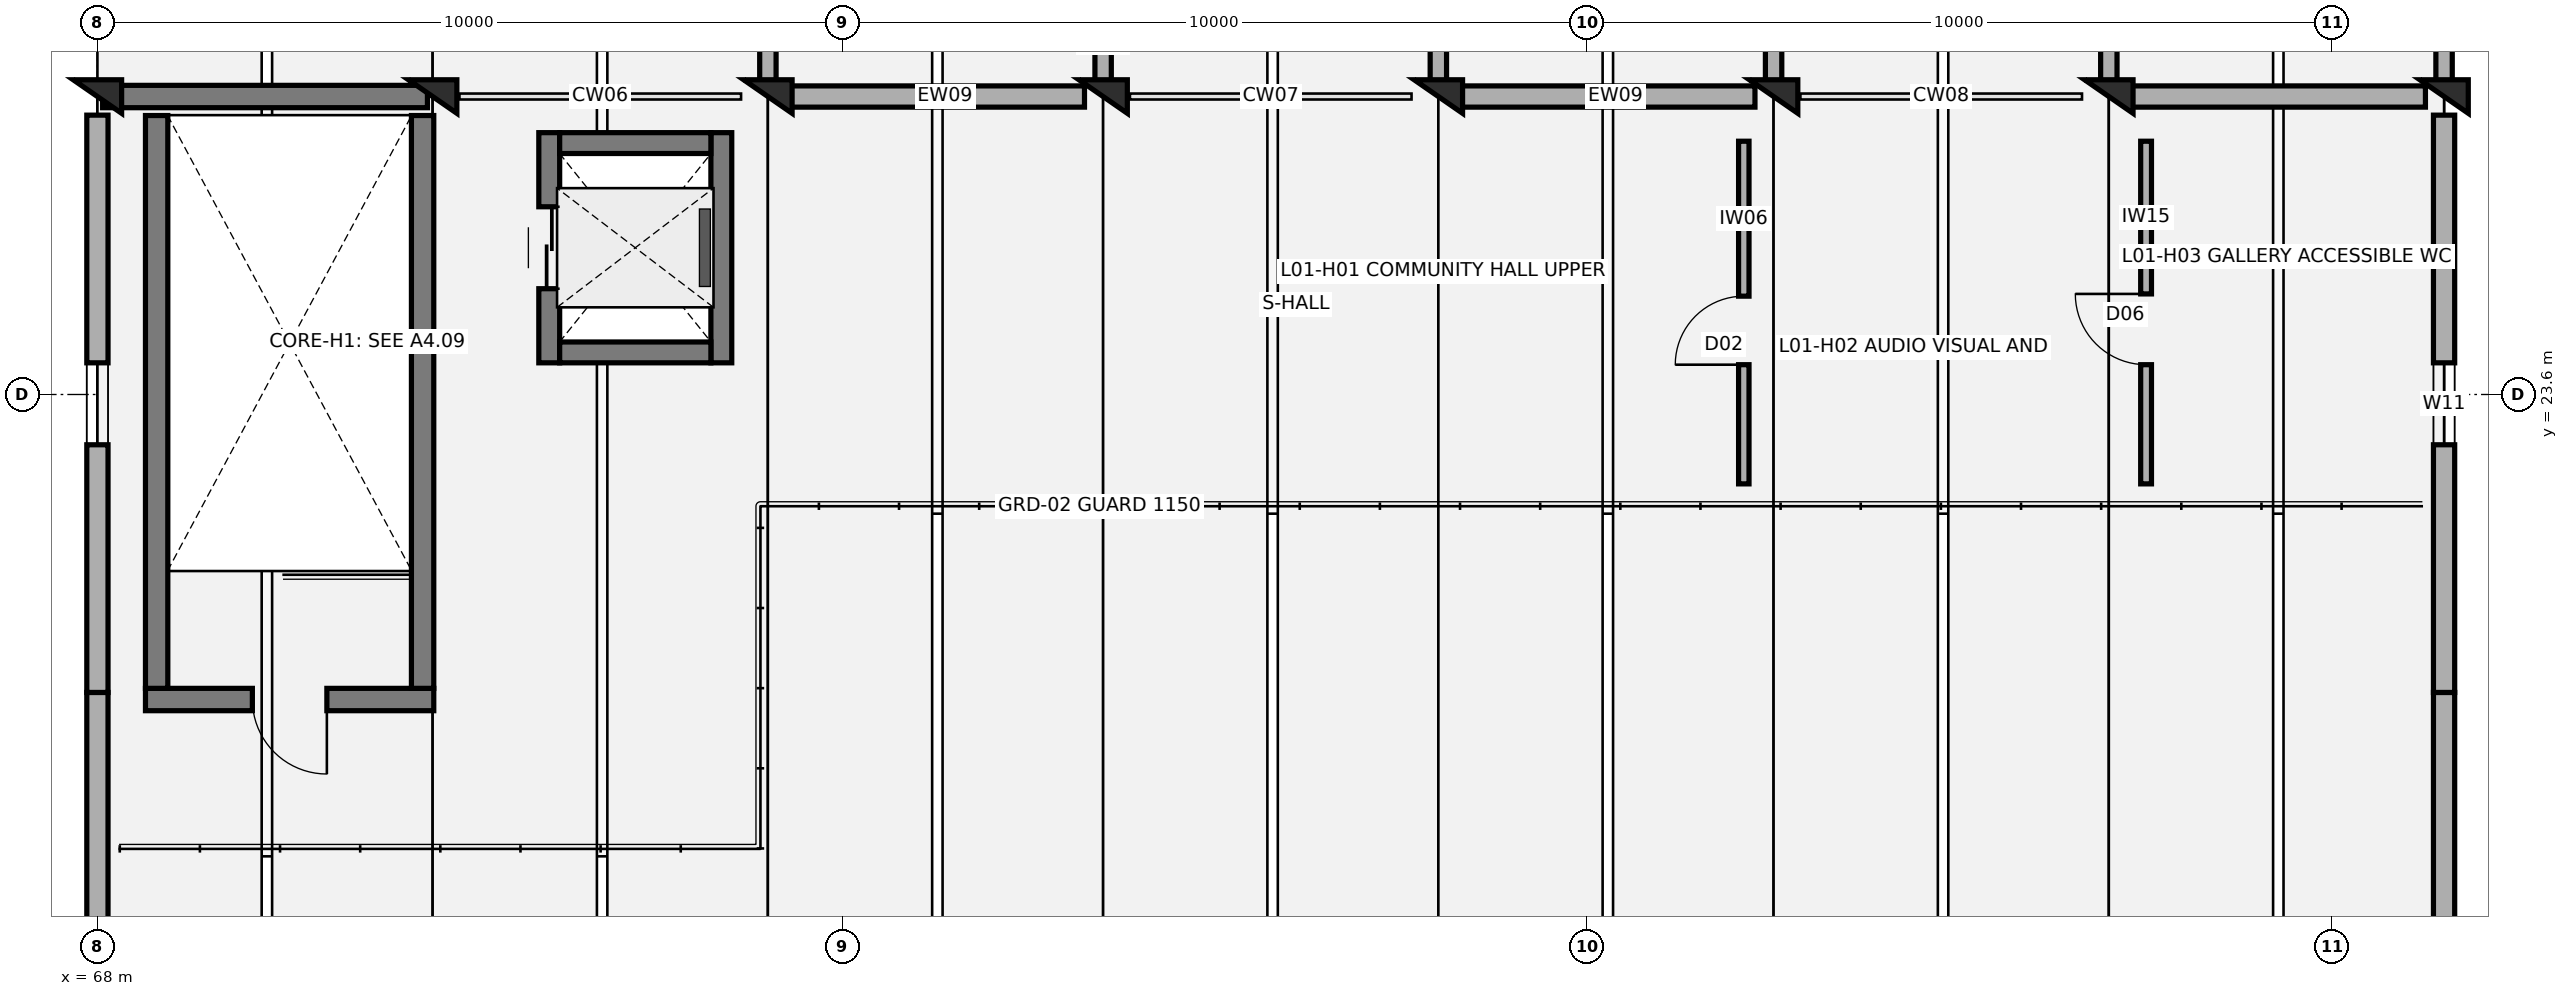
"""IFC4 building model, lengths in metres.
Left out: names, types, materials, properties, quantities, classifications, styles, units other than length and angle.
Written with IfcOpenShell. Run it as: python <this file> out.ifc"""

import sys

from ifc_helpers import new_model, si_unit, direction, frame, frame_2d, origin, origin_2d, place, context, subcontext, project, spatial, rectangle, extrude, element, fill, save


model = new_model("IFC4")
c1 = context("Model", 3, precision=1e-05, world=origin(), true_north=direction((0.0, 1.0)))
c2 = subcontext(c1, "Body", "Model", "MODEL_VIEW")
j1 = project(units=[si_unit("LENGTHUNIT", "METRE"), si_unit("PLANEANGLEUNIT", "RADIAN")], contexts=[c1])
p1 = place(None, origin())
s1 = spatial("IfcSite", under=j1, at=p1, CompositionType="ELEMENT")
p2 = place(p1, origin())
s2 = spatial("IfcBuilding", under=s1, at=p2, CompositionType="ELEMENT")
p3 = place(p2, frame((0.0, 0.0, 4.5)))
s3 = spatial("IfcBuildingStorey", under=s2, at=p3, CompositionType="ELEMENT", Elevation=4.5)
for number, where, z_axis, x_axis in (
    (1, (68.0, 27.6, 0.0), (0.0, 0.0, 1.0), (0.0, 1.0, 0.0)),
    (2, (72.5, 27.6, 0.0), (0.0, 0.0, 1.0), (0.0, 1.0, 0.0)),
    (3, (77.0, 27.6, 0.0), (0.0, 0.0, 1.0), (0.0, 1.0, 0.0)),
    (4, (81.5, 27.6, 0.0), (0.0, 0.0, 1.0), (0.0, 1.0, 0.0)),
    (5, (86.0, 27.6, 0.0), (0.0, 0.0, 1.0), (0.0, 1.0, 0.0)),
    (6, (90.5, 27.6, 0.0), (0.0, 0.0, 1.0), (0.0, 1.0, 0.0)),
    (7, (95.0, 27.6, 0.0), (0.0, 0.0, 1.0), (0.0, 1.0, 0.0)),
    (8, (99.5, 27.6, 0.0), (0.0, 0.0, 1.0), (0.0, 1.0, 0.0)),
):
    element("IfcColumn", number, at=place(p3, frame(where, z_axis=z_axis, x_axis=x_axis)), inside=s3, PredefinedType="COLUMN", context=c2, shape_type="SweptSolid", body=[
        extrude(rectangle(XDim=0.45, YDim=0.65, at=origin_2d()), origin(), (0.0, 0.0, 1.0), 3.7),
    ])
for number, where, z_axis, x_axis in (
    (9, (77.25, 27.6, 0.0), (0.0, 0.0, 1.0), (1.0, 0.0, 0.0)),
    (10, (86.25, 27.6, 0.0), (0.0, 0.0, 1.0), (1.0, 0.0, 0.0)),
    (11, (95.25, 27.6, 0.0), (0.0, 0.0, 1.0), (1.0, 0.0, 0.0)),
):
    element("IfcWall", number, at=place(p3, frame(where, z_axis=z_axis, x_axis=x_axis)), inside=s3, PredefinedType="SOLIDWALL", context=c2, shape_type="SweptSolid", body=[
        extrude(rectangle(XDim=4.0, YDim=0.285, at=frame_2d((2.0, 0.0))), origin(), (0.0, 0.0, 1.0), 2.25),
    ])
p4 = place(p3, frame((68.0, 11.6, 0.0), z_axis=(0.0, 0.0, 1.0), x_axis=(0.0, 1.0, 0.0)))
e12 = element("IfcWall", 12, at=p4, inside=s3, PredefinedType="SOLIDWALL", context=c2, shape_type="SweptSolid", body=[
    extrude(rectangle(XDim=8.0, YDim=0.285, at=frame_2d((4.0, 0.0))), origin(), (0.0, 0.0, 1.0), 2.25),
])
p5 = place(p4, frame((3.45, 0.0, 0.45)))
e13 = element("IfcOpeningElement", 13, at=p5, cuts=e12, PredefinedType="OPENING", context=c2, shape_type="SweptSolid", body=[
    extrude(rectangle(XDim=1.1, YDim=1.2, at=frame_2d((0.55, 0.6))), frame((0.0, 0.152, 0.0), z_axis=(0.0, -1.0, 0.0), x_axis=(1.0, 0.0, 0.0)), (0.0, 0.0, 1.0), 0.305),
])
p6 = place(p3, frame((68.0, 19.6, 0.0), z_axis=(0.0, 0.0, 1.0), x_axis=(0.0, 1.0, 0.0)))
e14 = element("IfcWall", 14, at=p6, inside=s3, PredefinedType="SOLIDWALL", context=c2, shape_type="SweptSolid", body=[
    extrude(rectangle(XDim=7.75, YDim=0.285, at=frame_2d((3.875, 0.0))), origin(), (0.0, 0.0, 1.0), 2.25),
])
p7 = place(p6, frame((3.325, 0.0, 0.45)))
e15 = element("IfcOpeningElement", 15, at=p7, cuts=e14, PredefinedType="OPENING", context=c2, shape_type="SweptSolid", body=[
    extrude(rectangle(XDim=1.1, YDim=1.2, at=frame_2d((0.55, 0.6))), frame((0.0, 0.152, 0.0), z_axis=(0.0, -1.0, 0.0), x_axis=(1.0, 0.0, 0.0)), (0.0, 0.0, 1.0), 0.305),
])
p8 = place(p3, frame((99.5, 11.6, 0.0), z_axis=(0.0, 0.0, 1.0), x_axis=(0.0, 1.0, 0.0)))
e16 = element("IfcWall", 16, at=p8, inside=s3, PredefinedType="SOLIDWALL", context=c2, shape_type="SweptSolid", body=[
    extrude(rectangle(XDim=8.0, YDim=0.285, at=frame_2d((4.0, 0.0))), origin(), (0.0, 0.0, 1.0), 2.25),
])
p9 = place(p8, frame((3.45, 0.0, 0.45)))
e17 = element("IfcOpeningElement", 17, at=p9, cuts=e16, PredefinedType="OPENING", context=c2, shape_type="SweptSolid", body=[
    extrude(rectangle(XDim=1.1, YDim=1.2, at=frame_2d((0.55, 0.6))), frame((0.0, 0.152, 0.0), z_axis=(0.0, -1.0, 0.0), x_axis=(1.0, 0.0, 0.0)), (0.0, 0.0, 1.0), 0.305),
])
p10 = place(p3, frame((99.5, 19.6, 0.0), z_axis=(0.0, 0.0, 1.0), x_axis=(0.0, 1.0, 0.0)))
e18 = element("IfcWall", 18, at=p10, inside=s3, PredefinedType="SOLIDWALL", context=c2, shape_type="SweptSolid", body=[
    extrude(rectangle(XDim=7.75, YDim=0.285, at=frame_2d((3.875, 0.0))), origin(), (0.0, 0.0, 1.0), 2.25),
])
p11 = place(p10, frame((3.325, 0.0, 0.45)))
e19 = element("IfcOpeningElement", 19, at=p11, cuts=e18, PredefinedType="OPENING", context=c2, shape_type="SweptSolid", body=[
    extrude(rectangle(XDim=1.1, YDim=1.2, at=frame_2d((0.55, 0.6))), frame((0.0, 0.152, 0.0), z_axis=(0.0, -1.0, 0.0), x_axis=(1.0, 0.0, 0.0)), (0.0, 0.0, 1.0), 0.305),
])
for number, where, z_axis, x_axis in (
    (20, (77.0, 27.78, 0.0), (0.0, 0.0, 1.0), (0.0, 1.0, 0.0)),
    (21, (81.5, 27.78, 0.0), (0.0, 0.0, 1.0), (0.0, 1.0, 0.0)),
    (22, (86.0, 27.78, 0.0), (0.0, 0.0, 1.0), (0.0, 1.0, 0.0)),
    (23, (90.5, 27.78, 0.0), (0.0, 0.0, 1.0), (0.0, 1.0, 0.0)),
    (24, (95.0, 27.78, 0.0), (0.0, 0.0, 1.0), (0.0, 1.0, 0.0)),
    (25, (99.5, 27.78, 0.0), (0.0, 0.0, 1.0), (0.0, 1.0, 0.0)),
):
    element("IfcWall", number, at=place(p3, frame(where, z_axis=z_axis, x_axis=x_axis)), inside=s3, PredefinedType="PARAPET", context=c2, shape_type="SweptSolid", body=[
        extrude(rectangle(XDim=0.87, YDim=0.22, at=frame_2d((0.435, 0.0))), origin(), (0.0, 0.0, 1.0), 3.1),
    ])
p12 = place(p3, frame((72.515, 19.505, 0.0), z_axis=(0.0, 0.0, 1.0), x_axis=(-1.0, 0.0, 0.0)))
e26 = element("IfcWall", 26, at=p12, inside=s3, PredefinedType="SHEAR", context=c2, shape_type="SweptSolid", body=[
    extrude(rectangle(XDim=3.87, YDim=0.3, at=frame_2d((1.935, 0.0))), origin(), (0.0, 0.0, 1.0), 3.6),
])
p13 = place(p12, frame((1.435, 0.0, 0.0)))
e27 = element("IfcOpeningElement", 27, at=p13, cuts=e26, PredefinedType="OPENING", context=c2, shape_type="SweptSolid", body=[
    extrude(rectangle(XDim=1.0, YDim=2.15, at=frame_2d((0.5, 1.075))), frame((0.0, 0.16, 0.0), z_axis=(0.0, -1.0, 0.0), x_axis=(1.0, 0.0, 0.0)), (0.0, 0.0, 1.0), 0.32),
])
p14 = place(p3, frame((72.43, 27.6, 0.0), z_axis=(0.0, 0.0, 1.0), x_axis=(-1.0, 0.0, 0.0)))
e28 = element("IfcWall", 28, at=p14, inside=s3, PredefinedType="SHEAR", context=c2, shape_type="SweptSolid", body=[
    extrude(rectangle(XDim=4.36, YDim=0.3, at=frame_2d((2.18, 0.0))), origin(), (0.0, 0.0, 1.0), 3.6),
])
for number, where, z_axis, x_axis in (
    (29, (72.365, 19.655, 0.0), (0.0, 0.0, 1.0), (0.0, 1.0, 0.0)),
    (30, (68.795, 19.655, 0.0), (0.0, 0.0, 1.0), (0.0, 1.0, 0.0)),
):
    element("IfcWall", number, at=place(p3, frame(where, z_axis=z_axis, x_axis=x_axis)), inside=s3, PredefinedType="SHEAR", context=c2, shape_type="SweptSolid", body=[
        extrude(rectangle(XDim=7.69, YDim=0.3, at=frame_2d((3.845, 0.0))), origin(), (0.0, 0.0, 1.0), 3.6),
    ])
p15 = place(p3, frame((74.065, 24.025, 0.0), z_axis=(0.0, 0.0, 1.0), x_axis=(0.0, 1.0, 0.0)))
e31 = element("IfcWall", 31, at=p15, inside=s3, PredefinedType="SHEAR", context=c2, shape_type="SweptSolid", body=[
    extrude(rectangle(XDim=3.09, YDim=0.28, at=frame_2d((1.545, 0.0))), origin(), (0.0, 0.0, 1.0), 3.6),
])
p16 = place(p15, frame((0.995, 0.0, 0.0)))
e32 = element("IfcOpeningElement", 32, at=p16, cuts=e31, PredefinedType="OPENING", context=c2, shape_type="SweptSolid", body=[
    extrude(rectangle(XDim=1.1, YDim=2.15, at=frame_2d((0.55, 1.075))), frame((0.0, 0.15, 0.0), z_axis=(0.0, -1.0, 0.0), x_axis=(1.0, 0.0, 0.0)), (0.0, 0.0, 1.0), 0.3),
])
p17 = place(p3, frame((76.375, 24.025, 0.0), z_axis=(0.0, 0.0, 1.0), x_axis=(0.0, 1.0, 0.0)))
e33 = element("IfcWall", 33, at=p17, inside=s3, PredefinedType="SHEAR", context=c2, shape_type="SweptSolid", body=[
    extrude(rectangle(XDim=3.09, YDim=0.28, at=frame_2d((1.545, 0.0))), origin(), (0.0, 0.0, 1.0), 3.6),
])
for number, where, z_axis, x_axis in (
    (34, (74.205, 24.165, 0.0), (0.0, 0.0, 1.0), (1.0, 0.0, 0.0)),
    (35, (74.205, 26.975, 0.0), (0.0, 0.0, 1.0), (1.0, 0.0, 0.0)),
):
    element("IfcWall", number, at=place(p3, frame(where, z_axis=z_axis, x_axis=x_axis)), inside=s3, PredefinedType="SHEAR", context=c2, shape_type="SweptSolid", body=[
        extrude(rectangle(XDim=2.03, YDim=0.28, at=frame_2d((1.015, 0.0))), origin(), (0.0, 0.0, 1.0), 3.6),
    ])
p18 = place(p3, frame((90.1, 22.4, 0.0), z_axis=(0.0, 0.0, 1.0), x_axis=(0.0, 1.0, 0.0)))
e36 = element("IfcWall", 36, at=p18, inside=s3, PredefinedType="PARTITIONING", context=c2, shape_type="SweptSolid", body=[
    extrude(rectangle(XDim=4.6, YDim=0.14, at=frame_2d((2.3, 0.0))), origin(), (0.0, 0.0, 1.0), 2.25),
])
p19 = place(p18, frame((1.6, 0.0, 0.0)))
e37 = element("IfcOpeningElement", 37, at=p19, cuts=e36, PredefinedType="OPENING", context=c2, shape_type="SweptSolid", body=[
    extrude(rectangle(XDim=0.92, YDim=2.1, at=frame_2d((0.46, 1.05))), frame((0.0, 0.08, 0.0), z_axis=(0.0, -1.0, 0.0), x_axis=(1.0, 0.0, 0.0)), (0.0, 0.0, 1.0), 0.16),
])
p20 = place(p3, frame((95.5, 22.4, 0.0), z_axis=(0.0, 0.0, 1.0), x_axis=(0.0, 1.0, 0.0)))
e38 = element("IfcWall", 38, at=p20, inside=s3, PredefinedType="PARTITIONING", context=c2, shape_type="SweptSolid", body=[
    extrude(rectangle(XDim=4.6, YDim=0.145, at=frame_2d((2.3, 0.0))), origin(), (0.0, 0.0, 1.0), 2.25),
])
p21 = place(p20, frame((1.6, 0.0, 0.0)))
e39 = element("IfcOpeningElement", 39, at=p21, cuts=e38, PredefinedType="OPENING", context=c2, shape_type="SweptSolid", body=[
    extrude(rectangle(XDim=0.95, YDim=2.1, at=frame_2d((0.475, 1.05))), frame((0.0, 0.083, 0.0), z_axis=(0.0, -1.0, 0.0), x_axis=(1.0, 0.0, 0.0)), (0.0, 0.0, 1.0), 0.165),
])
p22 = place(p7, origin())
e40 = element("IfcWindow", 40, at=p22, inside=s3, PartitioningType="SINGLE_PANEL", PredefinedType="WINDOW", context=c2, shape_type="SweptSolid", body=[
    extrude(rectangle(XDim=1.1, YDim=1.2, at=frame_2d((0.55, 0.6))), frame((0.0, 0.03, 0.0), z_axis=(0.0, -1.0, 0.0), x_axis=(1.0, 0.0, 0.0)), (0.0, 0.0, 1.0), 0.06),
])
fill(e15, e40)
p23 = place(p11, origin())
e41 = element("IfcWindow", 41, at=p23, inside=s3, PartitioningType="SINGLE_PANEL", PredefinedType="WINDOW", context=c2, shape_type="SweptSolid", body=[
    extrude(rectangle(XDim=1.1, YDim=1.2, at=frame_2d((0.55, 0.6))), frame((0.0, 0.03, 0.0), z_axis=(0.0, -1.0, 0.0), x_axis=(1.0, 0.0, 0.0)), (0.0, 0.0, 1.0), 0.06),
])
fill(e19, e41)
p24 = place(p13, origin())
e42 = element("IfcDoor", 42, at=p24, inside=s3, OperationType="SINGLE_SWING_LEFT", PredefinedType="DOOR", context=c2, shape_type="SweptSolid", body=[
    extrude(rectangle(XDim=1.0, YDim=2.15, at=frame_2d((0.5, 1.075))), frame((0.0, 0.025, 0.0), z_axis=(0.0, -1.0, 0.0), x_axis=(1.0, 0.0, 0.0)), (0.0, 0.0, 1.0), 0.05),
])
fill(e27, e42)
p25 = place(p16, origin())
e43 = element("IfcDoor", 43, at=p25, inside=s3, OperationType="DOUBLE_DOOR_SLIDING", PredefinedType="DOOR", context=c2, shape_type="SweptSolid", body=[
    extrude(rectangle(XDim=1.1, YDim=2.15, at=frame_2d((0.55, 1.075))), frame((0.0, 0.025, 0.0), z_axis=(0.0, -1.0, 0.0), x_axis=(1.0, 0.0, 0.0)), (0.0, 0.0, 1.0), 0.05),
])
fill(e32, e43)
p26 = place(p19, origin())
e44 = element("IfcDoor", 44, at=p26, inside=s3, OperationType="SINGLE_SWING_LEFT", PredefinedType="DOOR", context=c2, shape_type="SweptSolid", body=[
    extrude(rectangle(XDim=0.92, YDim=2.1, at=frame_2d((0.46, 1.05))), frame((0.0, 0.025, 0.0), z_axis=(0.0, -1.0, 0.0), x_axis=(1.0, 0.0, 0.0)), (0.0, 0.0, 1.0), 0.05),
])
fill(e37, e44)
p27 = place(p21, origin())
e45 = element("IfcDoor", 45, at=p27, inside=s3, OperationType="SINGLE_SWING_RIGHT", PredefinedType="DOOR", context=c2, shape_type="SweptSolid", body=[
    extrude(rectangle(XDim=0.95, YDim=2.1, at=frame_2d((0.475, 1.05))), frame((0.0, 0.025, 0.0), z_axis=(0.0, -1.0, 0.0), x_axis=(1.0, 0.0, 0.0)), (0.0, 0.0, 1.0), 0.05),
])
fill(e39, e45)
save(model, sys.argv[1])
